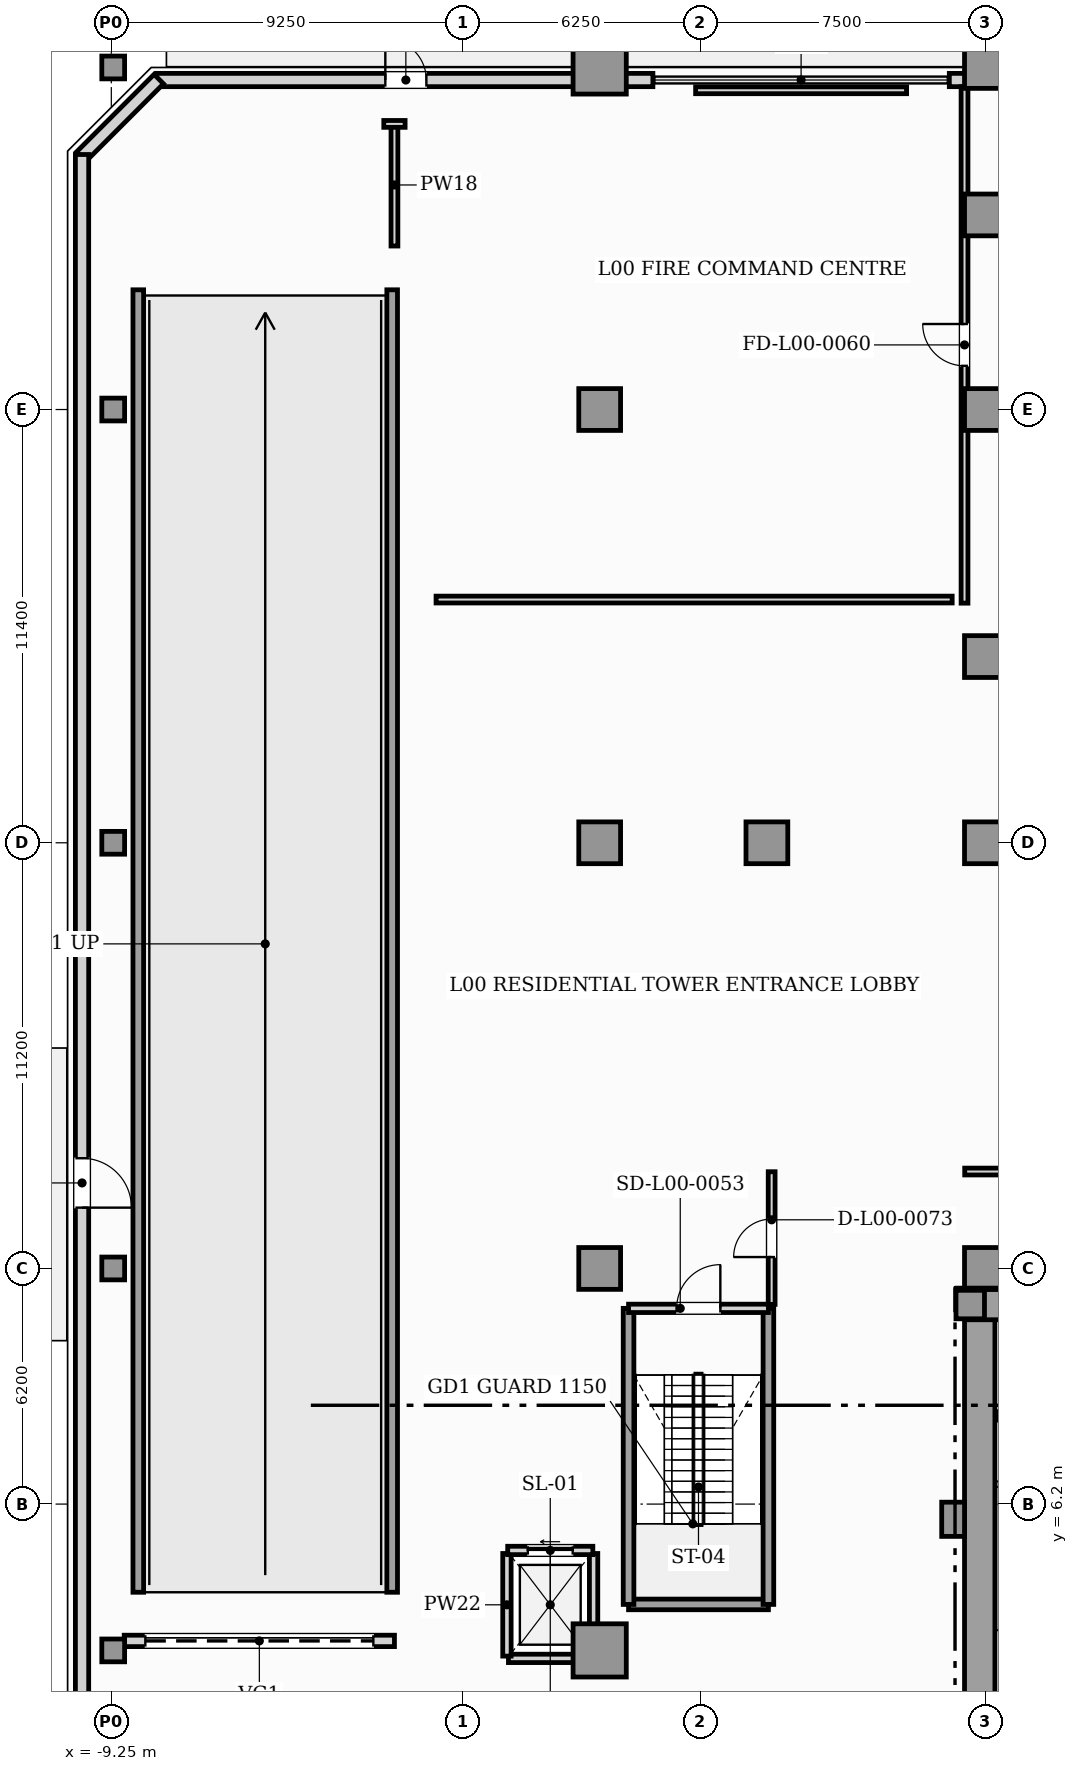
"""IFC4 building model, lengths in metres.
Left out: names, types, materials, properties, quantities, classifications, styles, units other than length and angle.
Written with IfcOpenShell. Run it as: python <this file> out.ifc"""

import sys

from ifc_helpers import new_model, si_unit, direction, frame, frame_2d, origin, origin_2d, place, context, subcontext, project, spatial, rectangle, hollow_rectangle, extrude, element, fill, save


model = new_model("IFC4")
c1 = context("Model", 3, precision=1e-05, world=origin(), true_north=direction((0.0, 1.0)))
c2 = subcontext(c1, "Body", "Model", "MODEL_VIEW")
j1 = project(units=[si_unit("LENGTHUNIT", "METRE"), si_unit("PLANEANGLEUNIT", "RADIAN")], contexts=[c1])
p1 = place(None, origin())
s1 = spatial("IfcSite", under=j1, at=p1, CompositionType="ELEMENT")
p2 = place(p1, origin())
s2 = spatial("IfcBuilding", under=s1, at=p2, CompositionType="ELEMENT")
p3 = place(p2, origin())
s3 = spatial("IfcBuildingStorey", under=s2, at=p3, CompositionType="ELEMENT", Elevation=0.0)
p4 = place(p3, frame((13.6, 0.92, 0.0), z_axis=(0.0, 0.0, 1.0), x_axis=(0.0, 1.0, 0.0)))
e1 = element("IfcWall", 1, at=p4, inside=s3, PredefinedType="SHEAR", context=c2, shape_type="SweptSolid", body=[
    extrude(rectangle(XDim=10.53, YDim=0.8, at=frame_2d((5.265, 0.0))), origin(), (0.0, 0.0, 1.0), 5.1),
])
p5 = place(p3, frame((13.25, 11.45, 0.0), z_axis=(0.0, 0.0, 1.0), x_axis=(1.0, 0.0, 0.0)))
e2 = element("IfcWall", 2, at=p5, inside=s3, PredefinedType="SHEAR", context=c2, shape_type="SweptSolid", body=[
    extrude(rectangle(XDim=2.95, YDim=0.8, at=frame_2d((1.475, 0.0))), origin(), (0.0, 0.0, 1.0), 5.1),
])
p6 = place(p3, frame((12.9, 5.8, 0.0), z_axis=(0.0, 0.0, 1.0), x_axis=(1.0, 0.0, 0.0)))
e3 = element("IfcColumn", 3, at=p6, inside=s3, PredefinedType="PILASTER", context=c2, shape_type="SweptSolid", body=[
    extrude(rectangle(XDim=0.6, YDim=0.9, at=origin_2d()), origin(), (0.0, 0.0, 1.0), 5.4),
])
for number, where, z_axis, x_axis in (
    (4, (-8.54, 3.88, 0.0), (0.0, 0.0, 1.0), (0.0, 1.0, 0.0)),
    (5, (-1.86, 3.88, 0.0), (0.0, 0.0, 1.0), (0.0, 1.0, 0.0)),
):
    element("IfcWall", number, at=place(p3, frame(where, z_axis=z_axis, x_axis=x_axis)), inside=s3, PredefinedType="SHEAR", context=c2, shape_type="SweptSolid", body=[
        extrude(rectangle(XDim=34.27, YDim=0.28, at=frame_2d((17.135, 0.0))), origin(), (0.0, 0.0, 1.0), 5.1),
    ])
p7 = place(p3, frame((13.35, 11.45, 0.0), z_axis=(0.0, 0.0, 1.0), x_axis=(1.0, 0.0, 0.0)))
e6 = element("IfcColumn", 6, at=p7, inside=s3, PredefinedType="COLUMN", context=c2, shape_type="SweptSolid", body=[
    extrude(rectangle(XDim=0.75, YDim=0.75, at=origin_2d()), origin(), (0.0, 0.0, 1.0), 5.4),
])
for number, where, z_axis, x_axis in (
    (7, (3.6, 2.35, 0.0), (0.0, 0.0, 1.0), (1.0, 0.0, 0.0)),
    (8, (3.6, 44.0, 0.0), (0.0, 0.0, 1.0), (1.0, 0.0, 0.0)),
):
    element("IfcColumn", number, at=place(p3, frame(where, z_axis=z_axis, x_axis=x_axis)), inside=s3, PredefinedType="USERDEFINED", context=c2, shape_type="SweptSolid", body=[
        extrude(hollow_rectangle(XDim=1.4, YDim=1.4, WallThickness=0.08, at=origin_2d()), origin(), (0.0, 0.0, 1.0), 5.4),
    ])
for number, where, z_axis, x_axis in (
    (9, (3.6, 12.4, 0.0), (0.0, 0.0, 1.0), (1.0, 0.0, 0.0)),
    (10, (3.6, 23.6, 0.0), (0.0, 0.0, 1.0), (1.0, 0.0, 0.0)),
    (11, (3.6, 35.0, 0.0), (0.0, 0.0, 1.0), (1.0, 0.0, 0.0)),
    (12, (13.75, 12.4, 0.0), (0.0, 0.0, 1.0), (1.0, 0.0, 0.0)),
    (13, (13.75, 23.6, 0.0), (0.0, 0.0, 1.0), (1.0, 0.0, 0.0)),
    (14, (13.75, 35.0, 0.0), (0.0, 0.0, 1.0), (1.0, 0.0, 0.0)),
    (15, (13.75, 44.0, 0.0), (0.0, 0.0, 1.0), (1.0, 0.0, 0.0)),
    (16, (8.0, 23.6, 0.0), (0.0, 0.0, 1.0), (1.0, 0.0, 0.0)),
    (17, (13.75, 28.5, 0.0), (0.0, 0.0, 1.0), (1.0, 0.0, 0.0)),
    (18, (13.75, 40.12, 0.0), (0.0, 0.0, 1.0), (1.0, 0.0, 0.0)),
):
    element("IfcColumn", number, at=place(p3, frame(where, z_axis=z_axis, x_axis=x_axis)), inside=s3, PredefinedType="COLUMN", context=c2, shape_type="SweptSolid", body=[
        extrude(rectangle(XDim=1.1, YDim=1.1, at=origin_2d()), origin(), (0.0, 0.0, 1.0), 5.4),
    ])
for number, where, z_axis, x_axis in (
    (19, (-9.2, 2.35, 0.0), (0.0, 0.0, 1.0), (1.0, 0.0, 0.0)),
    (20, (-9.2, 12.4, 0.0), (0.0, 0.0, 1.0), (1.0, 0.0, 0.0)),
    (21, (-9.2, 23.6, 0.0), (0.0, 0.0, 1.0), (1.0, 0.0, 0.0)),
    (22, (-9.2, 35.0, 0.0), (0.0, 0.0, 1.0), (1.0, 0.0, 0.0)),
    (23, (-9.2, 44.0, 0.0), (0.0, 0.0, 1.0), (1.0, 0.0, 0.0)),
):
    element("IfcColumn", number, at=place(p3, frame(where, z_axis=z_axis, x_axis=x_axis)), inside=s3, PredefinedType="COLUMN", context=c2, shape_type="SweptSolid", body=[
        extrude(hollow_rectangle(XDim=0.6, YDim=0.6, WallThickness=0.04, at=origin_2d()), origin(), (0.0, 0.0, 1.0), 5.4),
    ])
p8 = place(p3, frame((-8.06, 43.67, 0.0), z_axis=(0.0, 0.0, 1.0), x_axis=(1.0, 0.0, 0.0)))
e24 = element("IfcWall", 24, at=p8, inside=s3, PredefinedType="SOLIDWALL", context=c2, shape_type="SweptSolid", body=[
    extrude(rectangle(XDim=13.06, YDim=0.35, at=frame_2d((6.53, 0.0))), origin(), (0.0, 0.0, 1.0), 4.2),
])
p9 = place(p8, frame((6.02, 0.0, 0.0)))
e25 = element("IfcOpeningElement", 25, at=p9, cuts=e24, PredefinedType="OPENING", context=c2, shape_type="SweptSolid", body=[
    extrude(rectangle(XDim=1.08, YDim=2.25, at=frame_2d((0.54, 1.125))), frame((0.0, 0.185, 0.0), z_axis=(0.0, -1.0, 0.0), x_axis=(1.0, 0.0, 0.0)), (0.0, 0.0, 1.0), 0.37),
])
p10 = place(p3, frame((12.8, 43.67, 0.0), z_axis=(0.0, 0.0, 1.0), x_axis=(1.0, 0.0, 0.0)))
e26 = element("IfcWall", 26, at=p10, inside=s3, PredefinedType="SOLIDWALL", context=c2, shape_type="SweptSolid", body=[
    extrude(rectangle(XDim=1.9, YDim=0.35, at=frame_2d((0.95, 0.0))), origin(), (0.0, 0.0, 1.0), 4.483),
])
p11 = place(p3, frame((-8.001, 43.694, 0.0), z_axis=(0.0, 0.0, 1.0), x_axis=(-0.707106781187, -0.707106781187, 0.0)))
e27 = element("IfcWall", 27, at=p11, inside=s3, PredefinedType="SOLIDWALL", context=c2, shape_type="SweptSolid", body=[
    extrude(rectangle(XDim=2.89, YDim=0.35, at=frame_2d((1.445, 0.0))), origin(), (0.0, 0.0, 1.0), 5.1),
])
p12 = place(p3, frame((-10.02, 41.71, 0.0), z_axis=(0.0, 0.0, 1.0), x_axis=(0.0, -1.0, 0.0)))
e28 = element("IfcWall", 28, at=p12, inside=s3, PredefinedType="SOLIDWALL", context=c2, shape_type="SweptSolid", body=[
    extrude(rectangle(XDim=42.37, YDim=0.35, at=frame_2d((21.185, 0.0))), origin(), (0.0, 0.0, 1.0), 5.1),
])
p13 = place(p12, frame((26.41, 0.0, 0.0)))
e29 = element("IfcOpeningElement", 29, at=p13, cuts=e28, PredefinedType="OPENING", context=c2, shape_type="SweptSolid", body=[
    extrude(rectangle(XDim=1.3, YDim=2.2, at=frame_2d((0.65, 1.1))), frame((0.0, 0.185, 0.0), z_axis=(0.0, -1.0, 0.0), x_axis=(1.0, 0.0, 0.0)), (0.0, 0.0, 1.0), 0.37),
])
p14 = place(p3, frame((-8.91, 2.6, 0.0), z_axis=(0.0, 0.0, 1.0), x_axis=(1.0, 0.0, 0.0)))
e30 = element("IfcWall", 30, at=p14, inside=s3, PredefinedType="SOLIDWALL", context=c2, shape_type="SweptSolid", body=[
    extrude(rectangle(XDim=7.11, YDim=0.3, at=frame_2d((3.555, 0.0))), origin(), (0.0, 0.0, 1.0), 5.1),
])
p15 = place(p14, frame((0.555, 0.0, 0.0)))
e31 = element("IfcOpeningElement", 31, at=p15, cuts=e30, PredefinedType="OPENING", context=c2, shape_type="SweptSolid", body=[
    extrude(rectangle(XDim=6.0, YDim=3.4, at=frame_2d((3.0, 1.7))), frame((0.0, 0.16, 0.0), z_axis=(0.0, -1.0, 0.0), x_axis=(1.0, 0.0, 0.0)), (0.0, 0.0, 1.0), 0.32),
])
p16 = place(p3, frame((1.2, 2.14, 0.0), z_axis=(0.0, 0.0, 1.0), x_axis=(1.0, 0.0, 0.0)))
e32 = element("IfcWall", 32, at=p16, inside=s3, PredefinedType="SOLIDWALL", context=c2, shape_type="SweptSolid", body=[
    extrude(rectangle(XDim=2.2, YDim=0.22, at=frame_2d((1.1, 0.0))), origin(), (0.0, 0.0, 1.0), 5.1),
])
p17 = place(p3, frame((1.16, 2.2, 0.0), z_axis=(0.0, 0.0, 1.0), x_axis=(0.0, 1.0, 0.0)))
e33 = element("IfcWall", 33, at=p17, inside=s3, PredefinedType="SOLIDWALL", context=c2, shape_type="SweptSolid", body=[
    extrude(rectangle(XDim=2.7, YDim=0.22, at=frame_2d((1.35, 0.0))), origin(), (0.0, 0.0, 1.0), 5.1),
])
p18 = place(p3, frame((3.44, 2.2, 0.0), z_axis=(0.0, 0.0, 1.0), x_axis=(0.0, 1.0, 0.0)))
e34 = element("IfcWall", 34, at=p18, inside=s3, PredefinedType="SOLIDWALL", context=c2, shape_type="SweptSolid", body=[
    extrude(rectangle(XDim=2.7, YDim=0.22, at=frame_2d((1.35, 0.0))), origin(), (0.0, 0.0, 1.0), 4.483),
])
p19 = place(p3, frame((1.18, 4.98, 0.0), z_axis=(0.0, 0.0, 1.0), x_axis=(1.0, 0.0, 0.0)))
e35 = element("IfcWall", 35, at=p19, inside=s3, PredefinedType="SOLIDWALL", context=c2, shape_type="SweptSolid", body=[
    extrude(rectangle(XDim=2.24, YDim=0.22, at=frame_2d((1.12, 0.0))), origin(), (0.0, 0.0, 1.0), 5.1),
])
p20 = place(p19, frame((0.53, 0.0, 0.0)))
e36 = element("IfcOpeningElement", 36, at=p20, cuts=e35, PredefinedType="OPENING", context=c2, shape_type="SweptSolid", body=[
    extrude(rectangle(XDim=1.18, YDim=2.2, at=frame_2d((0.59, 1.1))), frame((0.0, 0.12, 0.0), z_axis=(0.0, -1.0, 0.0), x_axis=(1.0, 0.0, 0.0)), (0.0, 0.0, 1.0), 0.24),
])
p21 = place(p3, frame((14.04, 8.52, 0.0), z_axis=(0.0, 0.0, 1.0), x_axis=(1.0, 0.0, 0.0)))
e37 = element("IfcWall", 37, at=p21, inside=s3, PredefinedType="SOLIDWALL", context=c2, shape_type="SweptSolid", body=[
    extrude(rectangle(XDim=3.4, YDim=0.22, at=frame_2d((1.7, 0.0))), origin(), (0.0, 0.0, 1.0), 5.1),
])
p22 = place(p21, frame((1.125, 0.0, 0.0)))
e38 = element("IfcOpeningElement", 38, at=p22, cuts=e37, PredefinedType="OPENING", context=c2, shape_type="SweptSolid", body=[
    extrude(rectangle(XDim=1.15, YDim=2.2, at=frame_2d((0.575, 1.1))), frame((0.0, 0.12, 0.0), z_axis=(0.0, -1.0, 0.0), x_axis=(1.0, 0.0, 0.0)), (0.0, 0.0, 1.0), 0.24),
])
p23 = place(p3, frame((4.36, 3.56, 0.0), z_axis=(0.0, 0.0, 1.0), x_axis=(1.0, 0.0, 0.0)))
e39 = element("IfcWall", 39, at=p23, inside=s3, PredefinedType="SHEAR", context=c2, shape_type="SweptSolid", body=[
    extrude(rectangle(XDim=3.68, YDim=0.28, at=frame_2d((1.84, 0.0))), origin(), (0.0, 0.0, 1.0), 5.1),
])
for number, where, z_axis, x_axis in (
    (40, (4.36, 3.56, 0.0), (0.0, 0.0, 1.0), (0.0, 1.0, 0.0)),
    (41, (8.04, 3.56, 0.0), (0.0, 0.0, 1.0), (0.0, 1.0, 0.0)),
):
    element("IfcWall", number, at=place(p3, frame(where, z_axis=z_axis, x_axis=x_axis)), inside=s3, PredefinedType="SHEAR", context=c2, shape_type="SweptSolid", body=[
        extrude(rectangle(XDim=7.79, YDim=0.28, at=frame_2d((3.895, 0.0))), origin(), (0.0, 0.0, 1.0), 5.1),
    ])
p24 = place(p3, frame((4.36, 11.35, 0.0), z_axis=(0.0, 0.0, 1.0), x_axis=(1.0, 0.0, 0.0)))
e42 = element("IfcWall", 42, at=p24, inside=s3, PredefinedType="SOLIDWALL", context=c2, shape_type="SweptSolid", body=[
    extrude(rectangle(XDim=3.68, YDim=0.22, at=frame_2d((1.84, 0.0))), origin(), (0.0, 0.0, 1.0), 5.1),
])
p25 = place(p24, frame((1.265, 0.0, 0.0)))
e43 = element("IfcOpeningElement", 43, at=p25, cuts=e42, PredefinedType="OPENING", context=c2, shape_type="SweptSolid", body=[
    extrude(rectangle(XDim=1.15, YDim=2.2, at=frame_2d((0.575, 1.1))), frame((0.0, 0.12, 0.0), z_axis=(0.0, -1.0, 0.0), x_axis=(1.0, 0.0, 0.0)), (0.0, 0.0, 1.0), 0.24),
])
p26 = place(p3, frame((13.2, 29.905, 0.0), z_axis=(0.0, 0.0, 1.0), x_axis=(0.0, 1.0, 0.0)))
e44 = element("IfcWall", 44, at=p26, inside=s3, PredefinedType="PARTITIONING", context=c2, shape_type="SweptSolid", body=[
    extrude(rectangle(XDim=13.59, YDim=0.18, at=frame_2d((6.795, 0.0))), origin(), (0.0, 0.0, 1.0), 5.1),
])
p27 = place(p26, frame((6.245, 0.0, 0.0)))
e45 = element("IfcOpeningElement", 45, at=p27, cuts=e44, PredefinedType="OPENING", context=c2, shape_type="SweptSolid", body=[
    extrude(rectangle(XDim=1.1, YDim=2.2, at=frame_2d((0.55, 1.1))), frame((0.0, 0.1, 0.0), z_axis=(0.0, -1.0, 0.0), x_axis=(1.0, 0.0, 0.0)), (0.0, 0.0, 1.0), 0.2),
])
p28 = place(p3, frame((13.205, 14.95, 0.0), z_axis=(0.0, 0.0, 1.0), x_axis=(1.0, 0.0, 0.0)))
e46 = element("IfcWall", 46, at=p28, inside=s3, PredefinedType="PARTITIONING", context=c2, shape_type="SweptSolid", body=[
    extrude(rectangle(XDim=6.34, YDim=0.18, at=frame_2d((3.17, 0.0))), origin(), (0.0, 0.0, 1.0), 5.1),
])
p29 = place(p28, frame((2.67, 0.0, 0.0)))
e47 = element("IfcOpeningElement", 47, at=p29, cuts=e46, PredefinedType="OPENING", context=c2, shape_type="SweptSolid", body=[
    extrude(rectangle(XDim=1.0, YDim=2.15, at=frame_2d((0.5, 1.075))), frame((0.0, 0.1, 0.0), z_axis=(0.0, -1.0, 0.0), x_axis=(1.0, 0.0, 0.0)), (0.0, 0.0, 1.0), 0.2),
])
p30 = place(p3, frame((8.125, 11.455, 0.0), z_axis=(0.0, 0.0, 1.0), x_axis=(0.0, 1.0, 0.0)))
e48 = element("IfcWall", 48, at=p30, inside=s3, PredefinedType="PARTITIONING", context=c2, shape_type="SweptSolid", body=[
    extrude(rectangle(XDim=3.49, YDim=0.18, at=frame_2d((1.745, 0.0))), origin(), (0.0, 0.0, 1.0), 5.1),
])
p31 = place(p30, frame((1.245, 0.0, 0.0)))
e49 = element("IfcOpeningElement", 49, at=p31, cuts=e48, PredefinedType="OPENING", context=c2, shape_type="SweptSolid", body=[
    extrude(rectangle(XDim=1.0, YDim=2.15, at=frame_2d((0.5, 1.075))), frame((0.0, 0.1, 0.0), z_axis=(0.0, -1.0, 0.0), x_axis=(1.0, 0.0, 0.0)), (0.0, 0.0, 1.0), 0.2),
])
p32 = place(p3, frame((-0.705, 30.0, 0.0), z_axis=(0.0, 0.0, 1.0), x_axis=(1.0, 0.0, 0.0)))
e50 = element("IfcWall", 50, at=p32, inside=s3, PredefinedType="PARTITIONING", context=c2, shape_type="SweptSolid", body=[
    extrude(rectangle(XDim=13.58, YDim=0.18, at=frame_2d((6.79, 0.0))), origin(), (0.0, 0.0, 1.0), 5.1),
])
p33 = place(p3, frame((11.676, 43.4, 0.0), z_axis=(0.0, 0.0, 1.0), x_axis=(-1.0, 0.0, 0.0)))
e51 = element("IfcWall", 51, at=p33, inside=s3, PredefinedType="PARTITIONING", context=c2, shape_type="SweptSolid", body=[
    extrude(rectangle(XDim=5.551, YDim=0.18, at=frame_2d((2.775, 0.0))), origin(), (0.0, 0.0, 1.0), 5.1),
])
p34 = place(p3, frame((-1.8, 42.515, 0.0), z_axis=(0.0, 0.0, 1.0), x_axis=(0.0, -1.0, 0.0)))
e52 = element("IfcWall", 52, at=p34, inside=s3, PredefinedType="PARTITIONING", context=c2, shape_type="SweptSolid", body=[
    extrude(rectangle(XDim=3.213, YDim=0.18, at=frame_2d((1.606, 0.0))), origin(), (0.0, 0.0, 1.0), 5.1),
])
p35 = place(p3, frame((-1.52, 42.515, 0.0), z_axis=(0.0, 0.0, 1.0), x_axis=(-1.0, 0.0, 0.0)))
e53 = element("IfcWall", 53, at=p35, inside=s3, PredefinedType="PARTITIONING", context=c2, shape_type="SweptSolid", body=[
    extrude(rectangle(XDim=0.56, YDim=0.18, at=frame_2d((0.28, 0.0))), origin(), (0.0, 0.0, 1.0), 5.1),
])
p36 = place(p9, frame((1.08, 0.0, 0.0), z_axis=(0.0, 0.0, 1.0), x_axis=(-1.0, 0.0, 0.0)))
e54 = element("IfcDoor", 54, at=p36, inside=s3, OperationType="SINGLE_SWING_RIGHT", PredefinedType="DOOR", context=c2, shape_type="SweptSolid", body=[
    extrude(rectangle(XDim=1.08, YDim=2.25, at=frame_2d((0.54, 1.125))), frame((0.0, 0.025, 0.0), z_axis=(0.0, -1.0, 0.0), x_axis=(1.0, 0.0, 0.0)), (0.0, 0.0, 1.0), 0.05),
])
fill(e25, e54)
p37 = place(p13, frame((1.3, 0.0, 0.0), z_axis=(0.0, 0.0, 1.0), x_axis=(-1.0, 0.0, 0.0)))
e55 = element("IfcDoor", 55, at=p37, inside=s3, OperationType="SINGLE_SWING_LEFT", PredefinedType="DOOR", context=c2, shape_type="SweptSolid", body=[
    extrude(rectangle(XDim=1.3, YDim=2.2, at=frame_2d((0.65, 1.1))), frame((0.0, 0.025, 0.0), z_axis=(0.0, -1.0, 0.0), x_axis=(1.0, 0.0, 0.0)), (0.0, 0.0, 1.0), 0.05),
])
fill(e29, e55)
p38 = place(p15, origin())
e56 = element("IfcDoor", 56, at=p38, inside=s3, OperationType="ROLLINGUP", PredefinedType="GATE", context=c2, shape_type="SweptSolid", body=[
    extrude(rectangle(XDim=6.0, YDim=3.4, at=frame_2d((3.0, 1.7))), frame((0.0, 0.025, 0.0), z_axis=(0.0, -1.0, 0.0), x_axis=(1.0, 0.0, 0.0)), (0.0, 0.0, 1.0), 0.05),
])
fill(e31, e56)
p39 = place(p20, origin())
e57 = element("IfcDoor", 57, at=p39, inside=s3, OperationType="SLIDING_TO_LEFT", PredefinedType="DOOR", context=c2, shape_type="SweptSolid", body=[
    extrude(rectangle(XDim=1.18, YDim=2.2, at=frame_2d((0.59, 1.1))), frame((0.0, 0.025, 0.0), z_axis=(0.0, -1.0, 0.0), x_axis=(1.0, 0.0, 0.0)), (0.0, 0.0, 1.0), 0.05),
])
fill(e36, e57)
p40 = place(p25, origin())
e58 = element("IfcDoor", 58, at=p40, inside=s3, OperationType="SINGLE_SWING_RIGHT", PredefinedType="DOOR", context=c2, shape_type="SweptSolid", body=[
    extrude(rectangle(XDim=1.15, YDim=2.2, at=frame_2d((0.575, 1.1))), frame((0.0, 0.025, 0.0), z_axis=(0.0, -1.0, 0.0), x_axis=(1.0, 0.0, 0.0)), (0.0, 0.0, 1.0), 0.05),
])
fill(e43, e58)
p41 = place(p27, origin())
e59 = element("IfcDoor", 59, at=p41, inside=s3, OperationType="SINGLE_SWING_RIGHT", PredefinedType="DOOR", context=c2, shape_type="SweptSolid", body=[
    extrude(rectangle(XDim=1.1, YDim=2.2, at=frame_2d((0.55, 1.1))), frame((0.0, 0.025, 0.0), z_axis=(0.0, -1.0, 0.0), x_axis=(1.0, 0.0, 0.0)), (0.0, 0.0, 1.0), 0.05),
])
fill(e45, e59)
p42 = place(p31, origin())
e60 = element("IfcDoor", 60, at=p42, inside=s3, OperationType="SINGLE_SWING_LEFT", PredefinedType="DOOR", context=c2, shape_type="SweptSolid", body=[
    extrude(rectangle(XDim=1.0, YDim=2.15, at=frame_2d((0.5, 1.075))), frame((0.0, 0.025, 0.0), z_axis=(0.0, -1.0, 0.0), x_axis=(1.0, 0.0, 0.0)), (0.0, 0.0, 1.0), 0.05),
])
fill(e49, e60)
save(model, sys.argv[1])
